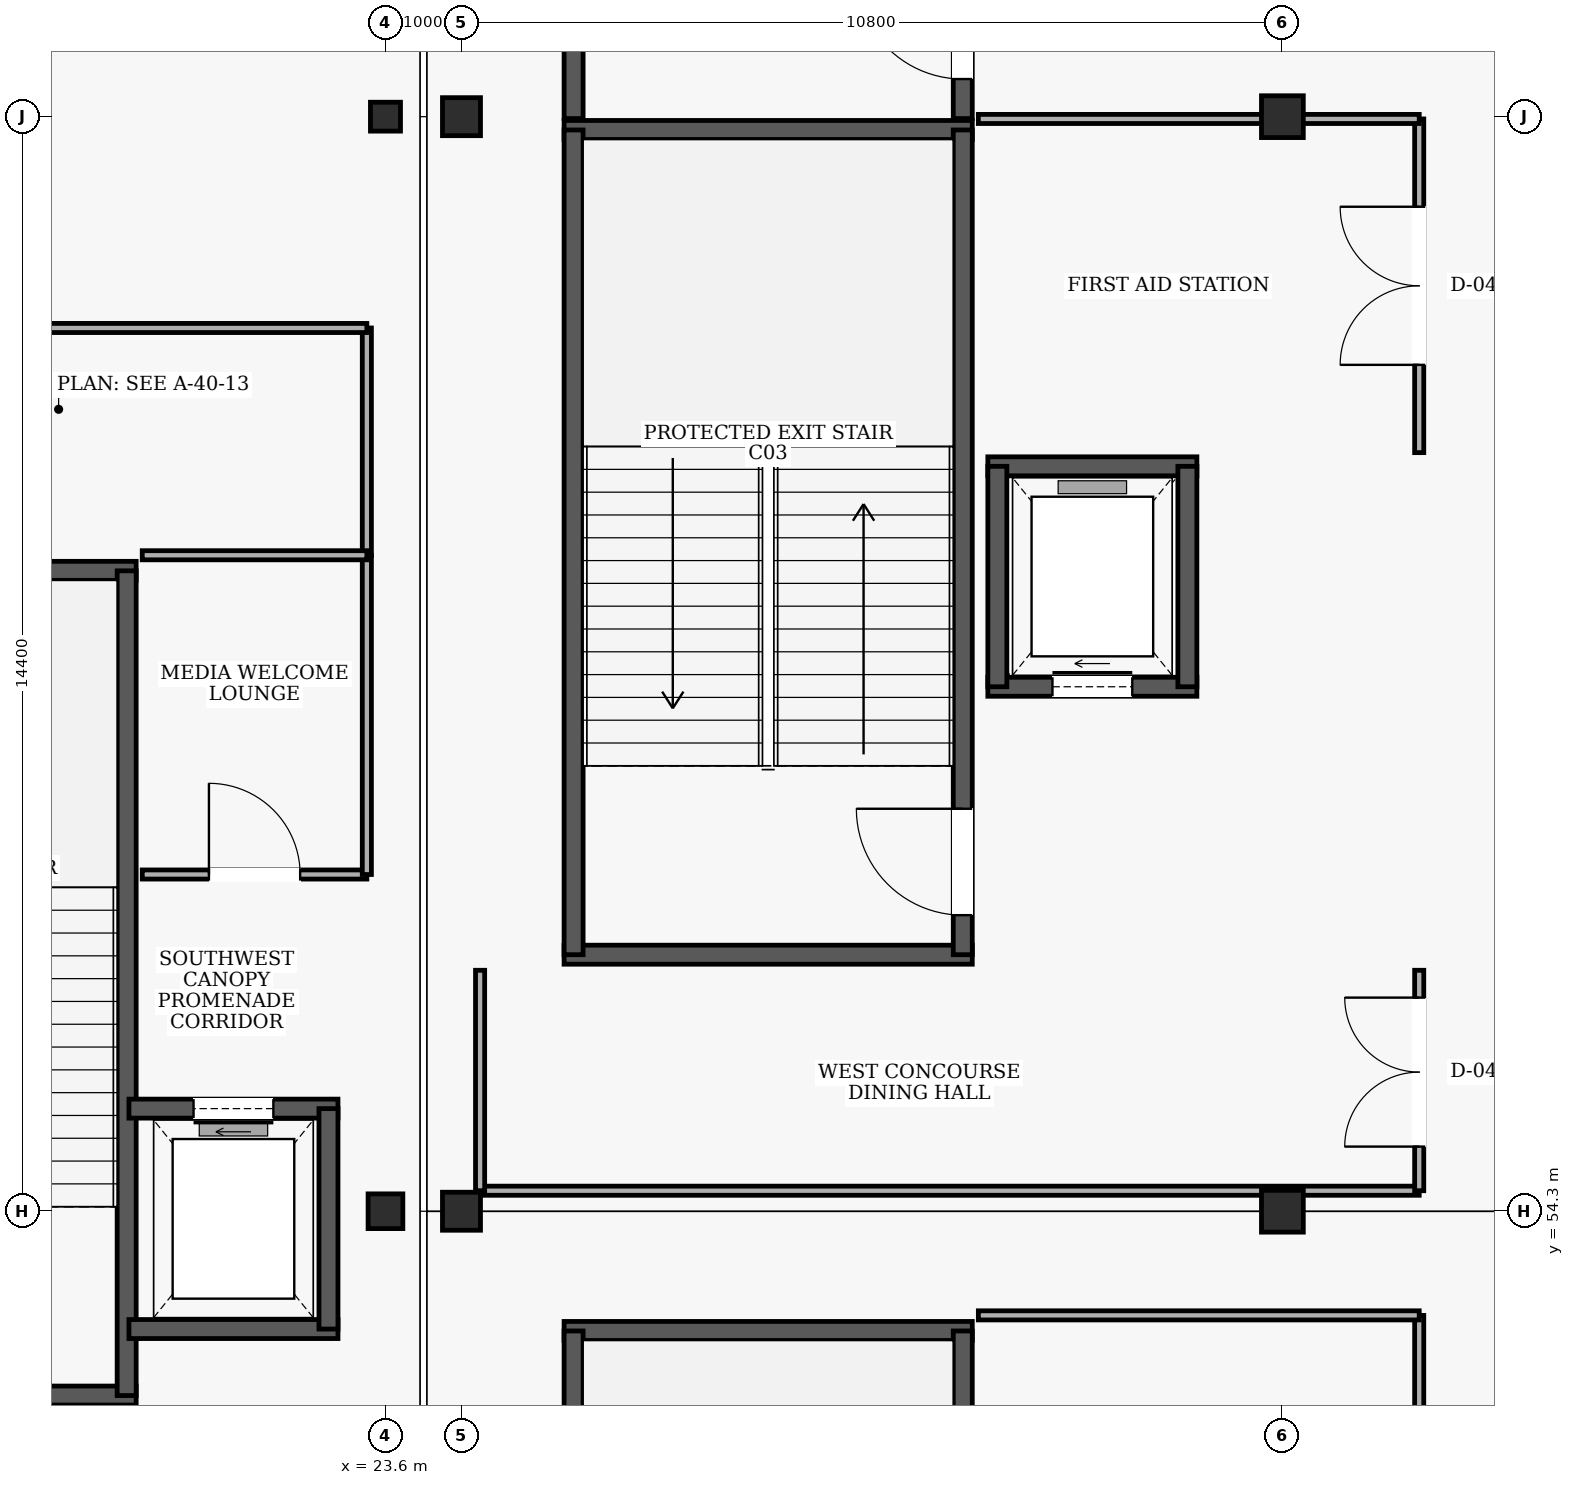
"""IFC4 building model, lengths in metres.
Left out: names, types, materials, properties, quantities, classifications, styles, units other than length and angle.
Written with IfcOpenShell. Run it as: python <this file> out.ifc"""

import sys

from ifc_helpers import new_model, si_unit, direction, frame, frame_2d, origin, origin_2d, place, context, subcontext, project, spatial, rectangle, hollow_circle, i_section, extrude, element, fill, save


model = new_model("IFC4")
c1 = context("Model", 3, precision=1e-05, world=origin(), true_north=direction((0.0, 1.0)))
c2 = subcontext(c1, "Body", "Model", "MODEL_VIEW")
j1 = project(units=[si_unit("LENGTHUNIT", "METRE"), si_unit("PLANEANGLEUNIT", "RADIAN")], contexts=[c1])
p1 = place(None, origin())
s1 = spatial("IfcSite", under=j1, at=p1, CompositionType="ELEMENT")
p2 = place(p1, origin())
s2 = spatial("IfcBuilding", under=s1, at=p2, CompositionType="ELEMENT")
p3 = place(p2, frame((0.0, 0.0, 5.4)))
s3 = spatial("IfcBuildingStorey", under=s2, at=p3, CompositionType="ELEMENT", Elevation=5.4)
p4 = place(p3, frame((23.6, 54.3, 0.0), z_axis=(0.0, 0.0, 1.0), x_axis=(1.0, 0.0, 0.0)))
e1 = element("IfcColumn", 1, at=p4, inside=s3, PredefinedType="COLUMN", context=c2, shape_type="SweptSolid", body=[
    extrude(hollow_circle(Radius=0.229, WallThickness=0.02, at=origin_2d()), origin(), (0.0, 0.0, 1.0), 4.8),
])
p5 = place(p3, frame((23.6, 68.7, 0.0), z_axis=(0.0, 0.0, 1.0), x_axis=(1.0, 0.0, 0.0)))
e2 = element("IfcColumn", 2, at=p5, inside=s3, PredefinedType="COLUMN", context=c2, shape_type="SweptSolid", body=[
    extrude(i_section(OverallWidth=0.395, OverallDepth=0.38, WebThickness=0.019, FlangeThickness=0.03, at=origin_2d()), origin(), (0.0, 0.0, 1.0), 4.8),
])
for number, where, z_axis, x_axis in (
    (3, (24.6, 54.3, 0.0), (0.0, 0.0, 1.0), (1.0, 0.0, 0.0)),
    (4, (24.6, 68.7, 0.0), (0.0, 0.0, 1.0), (1.0, 0.0, 0.0)),
):
    element("IfcColumn", number, at=place(p3, frame(where, z_axis=z_axis, x_axis=x_axis)), inside=s3, PredefinedType="COLUMN", context=c2, shape_type="SweptSolid", body=[
        extrude(rectangle(XDim=0.5, YDim=0.5, at=origin_2d()), origin(), (0.0, 0.0, 1.0), 4.8),
    ])
for number, where, z_axis, x_axis in (
    (5, (35.4, 54.3, 0.0), (0.0, 0.0, 1.0), (1.0, 0.0, 0.0)),
    (6, (35.4, 68.7, 0.0), (0.0, 0.0, 1.0), (1.0, 0.0, 0.0)),
):
    element("IfcColumn", number, at=place(p3, frame(where, z_axis=z_axis, x_axis=x_axis)), inside=s3, PredefinedType="COLUMN", context=c2, shape_type="SweptSolid", body=[
        extrude(rectangle(XDim=0.55, YDim=0.55, at=origin_2d()), origin(), (0.0, 0.0, 1.0), 4.8),
    ])
p6 = place(p3, frame((31.32, 52.725, 0.0), z_axis=(0.0, 0.0, 1.0), x_axis=(-1.0, 0.0, 0.0)))
e7 = element("IfcWall", 7, at=p6, inside=s3, PredefinedType="SHEAR", context=c2, shape_type="SweptSolid", body=[
    extrude(rectangle(XDim=5.37, YDim=0.25, at=frame_2d((2.685, 0.0))), origin(), (0.0, 0.0, 1.0), 4.5),
])
p7 = place(p3, frame((26.075, 41.875, 0.0), z_axis=(0.0, 0.0, 1.0), x_axis=(0.0, 1.0, 0.0)))
e8 = element("IfcWall", 8, at=p7, inside=s3, PredefinedType="SHEAR", context=c2, shape_type="SweptSolid", body=[
    extrude(rectangle(XDim=10.85, YDim=0.25, at=frame_2d((5.425, 0.0))), origin(), (0.0, 0.0, 1.0), 4.5),
])
p8 = place(p3, frame((31.195, 41.875, 0.0), z_axis=(0.0, 0.0, 1.0), x_axis=(0.0, 1.0, 0.0)))
e9 = element("IfcWall", 9, at=p8, inside=s3, PredefinedType="SHEAR", context=c2, shape_type="SweptSolid", body=[
    extrude(rectangle(XDim=10.85, YDim=0.25, at=frame_2d((5.425, 0.0))), origin(), (0.0, 0.0, 1.0), 4.5),
])
p9 = place(p8, frame((0.52, 0.0, 0.0)))
e10 = element("IfcOpeningElement", 10, at=p9, cuts=e9, PredefinedType="OPENING", context=c2, shape_type="SweptSolid", body=[
    extrude(rectangle(XDim=1.4, YDim=2.15, at=frame_2d((0.7, 1.075))), frame((0.0, 0.135, 0.0), z_axis=(0.0, -1.0, 0.0), x_axis=(1.0, 0.0, 0.0)), (0.0, 0.0, 1.0), 0.27),
])
for number, where, z_axis, x_axis in (
    (11, (25.95, 57.675, 0.0), (0.0, 0.0, 1.0), (1.0, 0.0, 0.0)),
    (12, (31.32, 68.525, 0.0), (0.0, 0.0, 1.0), (-1.0, 0.0, 0.0)),
):
    element("IfcWall", number, at=place(p3, frame(where, z_axis=z_axis, x_axis=x_axis)), inside=s3, PredefinedType="SHEAR", context=c2, shape_type="SweptSolid", body=[
        extrude(rectangle(XDim=5.37, YDim=0.25, at=frame_2d((2.685, 0.0))), origin(), (0.0, 0.0, 1.0), 4.5),
    ])
p10 = place(p3, frame((26.075, 57.675, 0.0), z_axis=(0.0, 0.0, 1.0), x_axis=(0.0, 1.0, 0.0)))
e13 = element("IfcWall", 13, at=p10, inside=s3, PredefinedType="SHEAR", context=c2, shape_type="SweptSolid", body=[
    extrude(rectangle(XDim=10.85, YDim=0.25, at=frame_2d((5.425, 0.0))), origin(), (0.0, 0.0, 1.0), 4.5),
])
p11 = place(p3, frame((31.195, 57.675, 0.0), z_axis=(0.0, 0.0, 1.0), x_axis=(0.0, 1.0, 0.0)))
e14 = element("IfcWall", 14, at=p11, inside=s3, PredefinedType="SHEAR", context=c2, shape_type="SweptSolid", body=[
    extrude(rectangle(XDim=10.85, YDim=0.25, at=frame_2d((5.425, 0.0))), origin(), (0.0, 0.0, 1.0), 4.5),
])
p12 = place(p11, frame((0.52, 0.0, 0.0)))
e15 = element("IfcOpeningElement", 15, at=p12, cuts=e14, PredefinedType="OPENING", context=c2, shape_type="SweptSolid", body=[
    extrude(rectangle(XDim=1.4, YDim=2.15, at=frame_2d((0.7, 1.075))), frame((0.0, 0.135, 0.0), z_axis=(0.0, -1.0, 0.0), x_axis=(1.0, 0.0, 0.0)), (0.0, 0.0, 1.0), 0.27),
])
p13 = place(p3, frame((26.075, 68.675, 0.0), z_axis=(0.0, 0.0, 1.0), x_axis=(0.0, 1.0, 0.0)))
e16 = element("IfcWall", 16, at=p13, inside=s3, PredefinedType="SHEAR", context=c2, shape_type="SweptSolid", body=[
    extrude(rectangle(XDim=10.85, YDim=0.25, at=frame_2d((5.425, 0.0))), origin(), (0.0, 0.0, 1.0), 4.5),
])
p14 = place(p3, frame((31.195, 68.675, 0.0), z_axis=(0.0, 0.0, 1.0), x_axis=(0.0, 1.0, 0.0)))
e17 = element("IfcWall", 17, at=p14, inside=s3, PredefinedType="SHEAR", context=c2, shape_type="SweptSolid", body=[
    extrude(rectangle(XDim=10.85, YDim=0.25, at=frame_2d((5.425, 0.0))), origin(), (0.0, 0.0, 1.0), 4.5),
])
p15 = place(p14, frame((0.52, 0.0, 0.0)))
e18 = element("IfcOpeningElement", 18, at=p15, cuts=e17, PredefinedType="OPENING", context=c2, shape_type="SweptSolid", body=[
    extrude(rectangle(XDim=1.4, YDim=2.15, at=frame_2d((0.7, 1.075))), frame((0.0, 0.135, 0.0), z_axis=(0.0, -1.0, 0.0), x_axis=(1.0, 0.0, 0.0)), (0.0, 0.0, 1.0), 0.27),
])
for number, where, z_axis, x_axis in (
    (19, (14.95, 51.875, 0.0), (0.0, 0.0, 1.0), (1.0, 0.0, 0.0)),
    (20, (20.32, 62.725, 0.0), (0.0, 0.0, 1.0), (-1.0, 0.0, 0.0)),
):
    element("IfcWall", number, at=place(p3, frame(where, z_axis=z_axis, x_axis=x_axis)), inside=s3, PredefinedType="SHEAR", context=c2, shape_type="SweptSolid", body=[
        extrude(rectangle(XDim=5.37, YDim=0.25, at=frame_2d((2.685, 0.0))), origin(), (0.0, 0.0, 1.0), 4.5),
    ])
p16 = place(p3, frame((20.195, 51.875, 0.0), z_axis=(0.0, 0.0, 1.0), x_axis=(0.0, 1.0, 0.0)))
e21 = element("IfcWall", 21, at=p16, inside=s3, PredefinedType="SHEAR", context=c2, shape_type="SweptSolid", body=[
    extrude(rectangle(XDim=10.85, YDim=0.25, at=frame_2d((5.425, 0.0))), origin(), (0.0, 0.0, 1.0), 4.5),
])
p17 = place(p3, frame((31.525, 61.2, 0.0), z_axis=(0.0, 0.0, 1.0), x_axis=(1.0, 0.0, 0.0)))
e22 = element("IfcWall", 22, at=p17, inside=s3, PredefinedType="SHEAR", context=c2, shape_type="SweptSolid", body=[
    extrude(rectangle(XDim=2.75, YDim=0.25, at=frame_2d((1.375, 0.0))), origin(), (0.0, 0.0, 1.0), 4.5),
])
p18 = place(p17, frame((0.85, 0.0, 0.0)))
e23 = element("IfcOpeningElement", 23, at=p18, cuts=e22, PredefinedType="OPENING", context=c2, shape_type="SweptSolid", body=[
    extrude(rectangle(XDim=1.05, YDim=2.15, at=frame_2d((0.525, 1.075))), frame((0.0, 0.135, 0.0), z_axis=(0.0, -1.0, 0.0), x_axis=(1.0, 0.0, 0.0)), (0.0, 0.0, 1.0), 0.27),
])
p19 = place(p3, frame((34.275, 64.1, 0.0), z_axis=(0.0, 0.0, 1.0), x_axis=(-1.0, 0.0, 0.0)))
e24 = element("IfcWall", 24, at=p19, inside=s3, PredefinedType="SHEAR", context=c2, shape_type="SweptSolid", body=[
    extrude(rectangle(XDim=2.75, YDim=0.25, at=frame_2d((1.375, 0.0))), origin(), (0.0, 0.0, 1.0), 4.5),
])
for number, where, z_axis, x_axis in (
    (25, (31.65, 64.1, 0.0), (0.0, 0.0, 1.0), (0.0, -1.0, 0.0)),
    (26, (34.15, 61.2, 0.0), (0.0, 0.0, 1.0), (0.0, 1.0, 0.0)),
):
    element("IfcWall", number, at=place(p3, frame(where, z_axis=z_axis, x_axis=x_axis)), inside=s3, PredefinedType="SHEAR", context=c2, shape_type="SweptSolid", body=[
        extrude(rectangle(XDim=2.9, YDim=0.25, at=frame_2d((1.45, 0.0))), origin(), (0.0, 0.0, 1.0), 4.5),
    ])
p20 = place(p3, frame((20.225, 52.75, 0.0), z_axis=(0.0, 0.0, 1.0), x_axis=(1.0, 0.0, 0.0)))
e27 = element("IfcWall", 27, at=p20, inside=s3, PredefinedType="SHEAR", context=c2, shape_type="SweptSolid", body=[
    extrude(rectangle(XDim=2.75, YDim=0.25, at=frame_2d((1.375, 0.0))), origin(), (0.0, 0.0, 1.0), 4.5),
])
p21 = place(p3, frame((22.975, 55.65, 0.0), z_axis=(0.0, 0.0, 1.0), x_axis=(-1.0, 0.0, 0.0)))
e28 = element("IfcWall", 28, at=p21, inside=s3, PredefinedType="SHEAR", context=c2, shape_type="SweptSolid", body=[
    extrude(rectangle(XDim=2.75, YDim=0.25, at=frame_2d((1.375, 0.0))), origin(), (0.0, 0.0, 1.0), 4.5),
])
p22 = place(p21, frame((0.85, 0.0, 0.0)))
e29 = element("IfcOpeningElement", 29, at=p22, cuts=e28, PredefinedType="OPENING", context=c2, shape_type="SweptSolid", body=[
    extrude(rectangle(XDim=1.05, YDim=2.15, at=frame_2d((0.525, 1.075))), frame((0.0, 0.135, 0.0), z_axis=(0.0, -1.0, 0.0), x_axis=(1.0, 0.0, 0.0)), (0.0, 0.0, 1.0), 0.27),
])
p23 = place(p3, frame((22.85, 52.75, 0.0), z_axis=(0.0, 0.0, 1.0), x_axis=(0.0, 1.0, 0.0)))
e30 = element("IfcWall", 30, at=p23, inside=s3, PredefinedType="SHEAR", context=c2, shape_type="SweptSolid", body=[
    extrude(rectangle(XDim=2.9, YDim=0.25, at=frame_2d((1.45, 0.0))), origin(), (0.0, 0.0, 1.0), 4.5),
])
p24 = place(p3, frame((37.2, 48.48, 0.0), z_axis=(0.0, 0.0, 1.0), x_axis=(0.0, 1.0, 0.0)))
e31 = element("IfcWall", 31, at=p24, inside=s3, PredefinedType="PARTITIONING", context=c2, shape_type="SweptSolid", body=[
    extrude(rectangle(XDim=4.45, YDim=0.12, at=frame_2d((2.225, 0.0))), origin(), (0.0, 0.0, 1.0), 4.5),
])
p25 = place(p24, frame((1.385, 0.0, 0.0)))
e32 = element("IfcOpeningElement", 32, at=p25, cuts=e31, PredefinedType="OPENING", context=c2, shape_type="SweptSolid", body=[
    extrude(rectangle(XDim=1.68, YDim=2.25, at=frame_2d((0.84, 1.125))), frame((0.0, 0.07, 0.0), z_axis=(0.0, -1.0, 0.0), x_axis=(1.0, 0.0, 0.0)), (0.0, 0.0, 1.0), 0.14),
])
p26 = place(p3, frame((37.2, 52.93, 0.0), z_axis=(0.0, 0.0, 1.0), x_axis=(-1.0, 0.0, 0.0)))
e33 = element("IfcWall", 33, at=p26, inside=s3, PredefinedType="PARTITIONING", context=c2, shape_type="SweptSolid", body=[
    extrude(rectangle(XDim=5.8, YDim=0.12, at=frame_2d((2.9, 0.0))), origin(), (0.0, 0.0, 1.0), 4.5),
])
p27 = place(p3, frame((24.845, 54.57, 0.0), z_axis=(0.0, 0.0, 1.0), x_axis=(1.0, 0.0, 0.0)))
e34 = element("IfcWall", 34, at=p27, inside=s3, PredefinedType="PARTITIONING", context=c2, shape_type="SweptSolid", body=[
    extrude(rectangle(XDim=12.355, YDim=0.12, at=frame_2d((6.177, 0.0))), origin(), (0.0, 0.0, 1.0), 3.58),
])
p28 = place(p3, frame((37.2, 54.57, 0.0), z_axis=(0.0, 0.0, 1.0), x_axis=(0.0, 1.0, 0.0)))
e35 = element("IfcWall", 35, at=p28, inside=s3, PredefinedType="PARTITIONING", context=c2, shape_type="SweptSolid", body=[
    extrude(rectangle(XDim=2.9, YDim=0.12, at=frame_2d((1.45, 0.0))), origin(), (0.0, 0.0, 1.0), 4.5),
])
p29 = place(p28, frame((0.58, 0.0, 0.0)))
e36 = element("IfcOpeningElement", 36, at=p29, cuts=e35, PredefinedType="OPENING", context=c2, shape_type="SweptSolid", body=[
    extrude(rectangle(XDim=1.96, YDim=2.3, at=frame_2d((0.98, 1.15))), frame((0.0, 0.07, 0.0), z_axis=(0.0, -1.0, 0.0), x_axis=(1.0, 0.0, 0.0)), (0.0, 0.0, 1.0), 0.14),
])
p30 = place(p3, frame((24.845, 57.47, 0.0), z_axis=(0.0, 0.0, 1.0), x_axis=(0.0, -1.0, 0.0)))
e37 = element("IfcWall", 37, at=p30, inside=s3, PredefinedType="PARTITIONING", context=c2, shape_type="SweptSolid", body=[
    extrude(rectangle(XDim=2.9, YDim=0.12, at=frame_2d((1.45, 0.0))), origin(), (0.0, 0.0, 1.0), 3.58),
])
p31 = place(p3, frame((37.2, 64.28, 0.0), z_axis=(0.0, 0.0, 1.0), x_axis=(0.0, 1.0, 0.0)))
e38 = element("IfcWall", 38, at=p31, inside=s3, PredefinedType="PARTITIONING", context=c2, shape_type="SweptSolid", body=[
    extrude(rectangle(XDim=4.39, YDim=0.12, at=frame_2d((2.195, 0.0))), origin(), (0.0, 0.0, 1.0), 4.5),
])
p32 = place(p31, frame((1.155, 0.0, 0.0)))
e39 = element("IfcOpeningElement", 39, at=p32, cuts=e38, PredefinedType="OPENING", context=c2, shape_type="SweptSolid", body=[
    extrude(rectangle(XDim=2.08, YDim=2.35, at=frame_2d((1.04, 1.175))), frame((0.0, 0.07, 0.0), z_axis=(0.0, -1.0, 0.0), x_axis=(1.0, 0.0, 0.0)), (0.0, 0.0, 1.0), 0.14),
])
p33 = place(p3, frame((37.2, 68.67, 0.0), z_axis=(0.0, 0.0, 1.0), x_axis=(-1.0, 0.0, 0.0)))
e40 = element("IfcWall", 40, at=p33, inside=s3, PredefinedType="PARTITIONING", context=c2, shape_type="SweptSolid", body=[
    extrude(rectangle(XDim=5.8, YDim=0.12, at=frame_2d((2.9, 0.0))), origin(), (0.0, 0.0, 1.0), 3.58),
])
p34 = place(p3, frame((23.355, 62.93, 0.0), z_axis=(0.0, 0.0, 1.0), x_axis=(0.0, 1.0, 0.0)))
e41 = element("IfcWall", 41, at=p34, inside=s3, PredefinedType="PARTITIONING", context=c2, shape_type="SweptSolid", body=[
    extrude(rectangle(XDim=2.99, YDim=0.12, at=frame_2d((1.495, 0.0))), origin(), (0.0, 0.0, 1.0), 4.03),
])
p35 = place(p3, frame((23.355, 65.92, 0.0), z_axis=(0.0, 0.0, 1.0), x_axis=(-1.0, 0.0, 0.0)))
e42 = element("IfcWall", 42, at=p35, inside=s3, PredefinedType="PARTITIONING", context=c2, shape_type="SweptSolid", body=[
    extrude(rectangle(XDim=12.355, YDim=0.12, at=frame_2d((6.177, 0.0))), origin(), (0.0, 0.0, 1.0), 4.5),
])
p36 = place(p3, frame((20.4, 58.73, 0.0), z_axis=(0.0, 0.0, 1.0), x_axis=(1.0, 0.0, 0.0)))
e43 = element("IfcWall", 43, at=p36, inside=s3, PredefinedType="PARTITIONING", context=c2, shape_type="SweptSolid", body=[
    extrude(rectangle(XDim=2.955, YDim=0.12, at=frame_2d((1.478, 0.0))), origin(), (0.0, 0.0, 1.0), 4.5),
])
p37 = place(p36, frame((0.877, 0.0, 0.0)))
e44 = element("IfcOpeningElement", 44, at=p37, cuts=e43, PredefinedType="OPENING", context=c2, shape_type="SweptSolid", body=[
    extrude(rectangle(XDim=1.2, YDim=2.15, at=frame_2d((0.6, 1.075))), frame((0.0, 0.07, 0.0), z_axis=(0.0, -1.0, 0.0), x_axis=(1.0, 0.0, 0.0)), (0.0, 0.0, 1.0), 0.14),
])
p38 = place(p3, frame((23.355, 58.73, 0.0), z_axis=(0.0, 0.0, 1.0), x_axis=(0.0, 1.0, 0.0)))
e45 = element("IfcWall", 45, at=p38, inside=s3, PredefinedType="PARTITIONING", context=c2, shape_type="SweptSolid", body=[
    extrude(rectangle(XDim=4.2, YDim=0.12, at=frame_2d((2.1, 0.0))), origin(), (0.0, 0.0, 1.0), 4.03),
])
p39 = place(p3, frame((23.355, 62.93, 0.0), z_axis=(0.0, 0.0, 1.0), x_axis=(-1.0, 0.0, 0.0)))
e46 = element("IfcWall", 46, at=p39, inside=s3, PredefinedType="PARTITIONING", context=c2, shape_type="SweptSolid", body=[
    extrude(rectangle(XDim=2.955, YDim=0.12, at=frame_2d((1.478, 0.0))), origin(), (0.0, 0.0, 1.0), 4.5),
])
p40 = place(p12, origin())
e47 = element("IfcDoor", 47, at=p40, inside=s3, OperationType="SINGLE_SWING_RIGHT", PredefinedType="DOOR", context=c2, shape_type="SweptSolid", body=[
    extrude(rectangle(XDim=1.4, YDim=2.15, at=frame_2d((0.7, 1.075))), frame((0.0, 0.025, 0.0), z_axis=(0.0, -1.0, 0.0), x_axis=(1.0, 0.0, 0.0)), (0.0, 0.0, 1.0), 0.05),
])
fill(e15, e47)
p41 = place(p15, origin())
e48 = element("IfcDoor", 48, at=p41, inside=s3, OperationType="SINGLE_SWING_RIGHT", PredefinedType="DOOR", context=c2, shape_type="SweptSolid", body=[
    extrude(rectangle(XDim=1.4, YDim=2.15, at=frame_2d((0.7, 1.075))), frame((0.0, 0.025, 0.0), z_axis=(0.0, -1.0, 0.0), x_axis=(1.0, 0.0, 0.0)), (0.0, 0.0, 1.0), 0.05),
])
fill(e18, e48)
p42 = place(p18, origin())
e49 = element("IfcDoor", 49, at=p42, inside=s3, OperationType="SLIDING_TO_RIGHT", PredefinedType="DOOR", context=c2, shape_type="SweptSolid", body=[
    extrude(rectangle(XDim=1.05, YDim=2.15, at=frame_2d((0.525, 1.075))), frame((0.0, 0.025, 0.0), z_axis=(0.0, -1.0, 0.0), x_axis=(1.0, 0.0, 0.0)), (0.0, 0.0, 1.0), 0.05),
])
fill(e23, e49)
p43 = place(p22, origin())
e50 = element("IfcDoor", 50, at=p43, inside=s3, OperationType="SLIDING_TO_LEFT", PredefinedType="DOOR", context=c2, shape_type="SweptSolid", body=[
    extrude(rectangle(XDim=1.05, YDim=2.15, at=frame_2d((0.525, 1.075))), frame((0.0, 0.025, 0.0), z_axis=(0.0, -1.0, 0.0), x_axis=(1.0, 0.0, 0.0)), (0.0, 0.0, 1.0), 0.05),
])
fill(e29, e50)
p44 = place(p29, origin())
e51 = element("IfcDoor", 51, at=p44, inside=s3, OperationType="DOUBLE_DOOR_SINGLE_SWING", PredefinedType="DOOR", context=c2, shape_type="SweptSolid", body=[
    extrude(rectangle(XDim=1.96, YDim=2.3, at=frame_2d((0.98, 1.15))), frame((0.0, 0.025, 0.0), z_axis=(0.0, -1.0, 0.0), x_axis=(1.0, 0.0, 0.0)), (0.0, 0.0, 1.0), 0.05),
])
fill(e36, e51)
p45 = place(p32, origin())
e52 = element("IfcDoor", 52, at=p45, inside=s3, OperationType="DOUBLE_DOOR_SINGLE_SWING", PredefinedType="DOOR", context=c2, shape_type="SweptSolid", body=[
    extrude(rectangle(XDim=2.08, YDim=2.35, at=frame_2d((1.04, 1.175))), frame((0.0, 0.025, 0.0), z_axis=(0.0, -1.0, 0.0), x_axis=(1.0, 0.0, 0.0)), (0.0, 0.0, 1.0), 0.05),
])
fill(e39, e52)
p46 = place(p37, origin())
e53 = element("IfcDoor", 53, at=p46, inside=s3, OperationType="SINGLE_SWING_LEFT", PredefinedType="DOOR", context=c2, shape_type="SweptSolid", body=[
    extrude(rectangle(XDim=1.2, YDim=2.15, at=frame_2d((0.6, 1.075))), frame((0.0, 0.025, 0.0), z_axis=(0.0, -1.0, 0.0), x_axis=(1.0, 0.0, 0.0)), (0.0, 0.0, 1.0), 0.05),
])
fill(e44, e53)
save(model, sys.argv[1])
